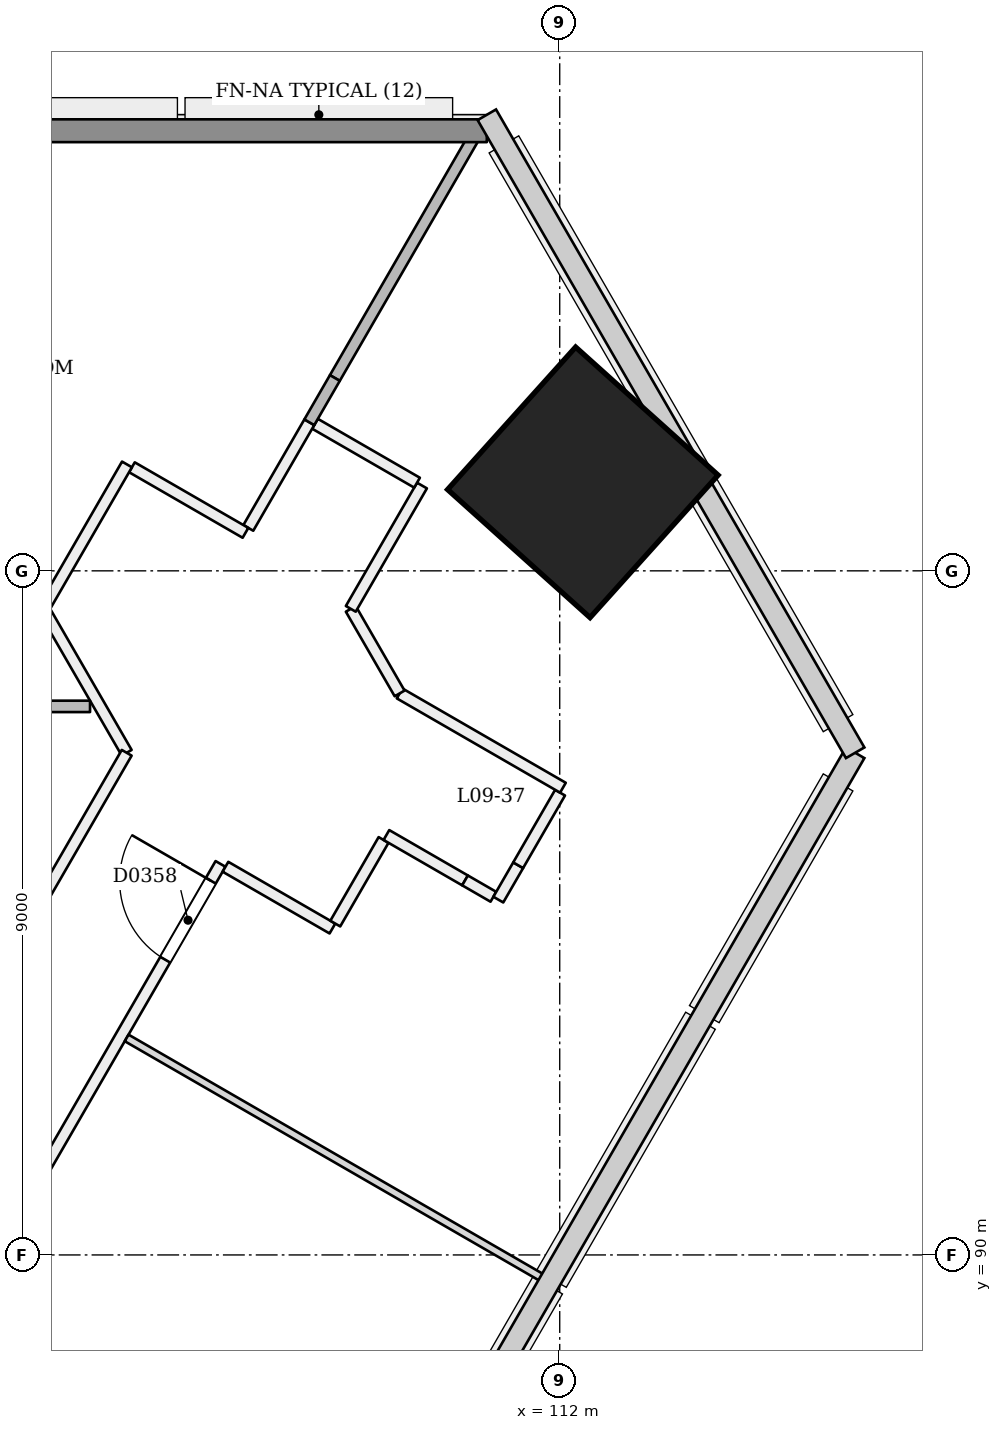
"""IFC4 building model, lengths in metres.
Left out: names, types, materials, properties, quantities, classifications, styles, units other than length and angle.
Written with IfcOpenShell. Run it as: python <this file> out.ifc"""

import sys

from ifc_helpers import new_model, si_unit, direction, frame, frame_2d, origin, origin_2d, place, context, subcontext, project, spatial, rectangle, extrude, element, fill, save


model = new_model("IFC4")
c1 = context("Model", 3, precision=1e-05, world=origin(), true_north=direction((0.0, 1.0)))
c2 = subcontext(c1, "Body", "Model", "MODEL_VIEW")
j1 = project(units=[si_unit("LENGTHUNIT", "METRE"), si_unit("PLANEANGLEUNIT", "RADIAN")], contexts=[c1])
p1 = place(None, origin())
s1 = spatial("IfcSite", under=j1, at=p1, CompositionType="ELEMENT")
p2 = place(p1, origin())
s2 = spatial("IfcBuilding", under=s1, at=p2, CompositionType="ELEMENT")
p3 = place(p2, frame((0.0, 0.0, 41.4)))
s3 = spatial("IfcBuildingStorey", under=s2, at=p3, CompositionType="ELEMENT", Elevation=41.4)
p4 = place(p3, frame((112.338, 100.153, 0.0), z_axis=(-0.028334066552, 0.009286524205, 0.999555371723), x_axis=(0.498272969513, -0.866736541076, 0.022176929837)))
e1 = element("IfcColumn", 1, at=p4, inside=s3, PredefinedType="COLUMN", context=c2, shape_type="SweptSolid", body=[
    extrude(rectangle(XDim=2.52, YDim=2.52, at=origin_2d()), origin(), (0.0, 0.0, 1.0), 3.602),
])
p5 = place(p3, frame((88.237, 61.716, 0.0), z_axis=(0.0, 0.0, 1.0), x_axis=(0.500002225217, 0.866024119051, 0.0)))
e2 = element("IfcWall", 2, at=p5, inside=s3, PredefinedType="PARTITIONING", context=c2, shape_type="SweptSolid", body=[
    extrude(rectangle(XDim=38.6, YDim=0.15, at=frame_2d((19.3, 0.0))), origin(), (0.0, 0.0, 1.0), 2.7),
])
p6 = place(p5, frame((0.72, 0.0, 0.0)))
e3 = element("IfcOpeningElement", 3, at=p6, cuts=e2, PredefinedType="OPENING", context=c2, shape_type="SweptSolid", body=[
    extrude(rectangle(XDim=1.0, YDim=2.1, at=frame_2d((0.5, 1.05))), frame((0.0, 0.085, 0.0), z_axis=(0.0, -1.0, 0.0), x_axis=(1.0, 0.0, 0.0)), (0.0, 0.0, 1.0), 0.171),
])
p7 = place(p5, frame((7.395, 0.0, 0.0)))
e4 = element("IfcOpeningElement", 4, at=p7, cuts=e2, PredefinedType="OPENING", context=c2, shape_type="SweptSolid", body=[
    extrude(rectangle(XDim=1.0, YDim=2.1, at=frame_2d((0.5, 1.05))), frame((0.0, 0.085, 0.0), z_axis=(0.0, -1.0, 0.0), x_axis=(1.0, 0.0, 0.0)), (0.0, 0.0, 1.0), 0.171),
])
p8 = place(p5, frame((9.605, 0.0, 0.0)))
e5 = element("IfcOpeningElement", 5, at=p8, cuts=e2, PredefinedType="OPENING", context=c2, shape_type="SweptSolid", body=[
    extrude(rectangle(XDim=1.0, YDim=2.1, at=frame_2d((0.5, 1.05))), frame((0.0, 0.085, 0.0), z_axis=(0.0, -1.0, 0.0), x_axis=(1.0, 0.0, 0.0)), (0.0, 0.0, 1.0), 0.171),
])
p9 = place(p5, frame((15.25, 0.0, 0.0)))
e6 = element("IfcOpeningElement", 6, at=p9, cuts=e2, PredefinedType="OPENING", context=c2, shape_type="SweptSolid", body=[
    extrude(rectangle(XDim=1.0, YDim=2.1, at=frame_2d((0.5, 1.05))), frame((0.0, 0.085, 0.0), z_axis=(0.0, -1.0, 0.0), x_axis=(1.0, 0.0, 0.0)), (0.0, 0.0, 1.0), 0.171),
])
p10 = place(p5, frame((18.605, 0.0, 0.0)))
e7 = element("IfcOpeningElement", 7, at=p10, cuts=e2, PredefinedType="OPENING", context=c2, shape_type="SweptSolid", body=[
    extrude(rectangle(XDim=1.0, YDim=2.1, at=frame_2d((0.5, 1.05))), frame((0.0, 0.085, 0.0), z_axis=(0.0, -1.0, 0.0), x_axis=(1.0, 0.0, 0.0)), (0.0, 0.0, 1.0), 0.171),
])
p11 = place(p5, frame((25.395, 0.0, 0.0)))
e8 = element("IfcOpeningElement", 8, at=p11, cuts=e2, PredefinedType="OPENING", context=c2, shape_type="SweptSolid", body=[
    extrude(rectangle(XDim=1.0, YDim=2.1, at=frame_2d((0.5, 1.05))), frame((0.0, 0.085, 0.0), z_axis=(0.0, -1.0, 0.0), x_axis=(1.0, 0.0, 0.0)), (0.0, 0.0, 1.0), 0.171),
])
p12 = place(p5, frame((29.8, 0.0, 0.0)))
e9 = element("IfcOpeningElement", 9, at=p12, cuts=e2, PredefinedType="OPENING", context=c2, shape_type="SweptSolid", body=[
    extrude(rectangle(XDim=1.2, YDim=2.1, at=frame_2d((0.6, 1.05))), frame((0.0, 0.085, 0.0), z_axis=(0.0, -1.0, 0.0), x_axis=(1.0, 0.0, 0.0)), (0.0, 0.0, 1.0), 0.171),
])
p13 = place(p5, frame((37.145, 0.0, 0.0)))
e10 = element("IfcOpeningElement", 10, at=p13, cuts=e2, PredefinedType="OPENING", context=c2, shape_type="SweptSolid", body=[
    extrude(rectangle(XDim=1.2, YDim=2.1, at=frame_2d((0.6, 1.05))), frame((0.0, 0.085, 0.0), z_axis=(0.0, -1.0, 0.0), x_axis=(1.0, 0.0, 0.0)), (0.0, 0.0, 1.0), 0.171),
])
p14 = place(p3, frame((107.602, 95.107, 0.0), z_axis=(0.0, 0.0, 1.0), x_axis=(0.866053003207, -0.499952193351, 0.0)))
e11 = element("IfcWall", 11, at=p14, inside=s3, PredefinedType="PARTITIONING", context=c2, shape_type="SweptSolid", body=[
    extrude(rectangle(XDim=1.625, YDim=0.15, at=frame_2d((0.812, 0.0))), origin(), (0.0, 0.0, 1.0), 3.1),
])
p15 = place(p3, frame((109.047, 94.359, 0.0), z_axis=(0.0, 0.0, 1.0), x_axis=(0.500066257368, 0.865987146695, 0.0)))
e12 = element("IfcWall", 12, at=p15, inside=s3, PredefinedType="PARTITIONING", context=c2, shape_type="SweptSolid", body=[
    extrude(rectangle(XDim=1.27, YDim=0.15, at=frame_2d((0.635, 0.0))), origin(), (0.0, 0.0, 1.0), 3.1),
])
p16 = place(p3, frame((109.72, 95.524, 0.0), z_axis=(0.0, 0.0, 1.0), x_axis=(0.866046033456, -0.499964266659, 0.0)))
e13 = element("IfcWall", 13, at=p16, inside=s3, PredefinedType="PARTITIONING", context=c2, shape_type="SweptSolid", body=[
    extrude(rectangle(XDim=1.194, YDim=0.15, at=frame_2d((0.597, 0.0))), origin(), (0.0, 0.0, 1.0), 3.1),
])
p17 = place(p3, frame((110.754, 94.927, 0.0), z_axis=(0.0, 0.0, 1.0), x_axis=(0.865930570761, -0.500164219654, 0.0)))
e14 = element("IfcWall", 14, at=p17, inside=s3, PredefinedType="PARTITIONING", context=c2, shape_type="SweptSolid", body=[
    extrude(rectangle(XDim=0.43, YDim=0.15, at=frame_2d((0.215, 0.0))), origin(), (0.0, 0.0, 1.0), 2.6),
])
p18 = place(p3, frame((111.192, 94.675, 0.0), z_axis=(0.0, 0.0, 1.0), x_axis=(0.500262019077, 0.865874074141, 0.0)))
e15 = element("IfcWall", 15, at=p18, inside=s3, PredefinedType="PARTITIONING", context=c2, shape_type="SweptSolid", body=[
    extrude(rectangle(XDim=0.522, YDim=0.15, at=frame_2d((0.261, 0.0))), origin(), (0.0, 0.0, 1.0), 2.6),
])
p19 = place(p3, frame((111.453, 95.127, 0.0), z_axis=(0.0, 0.0, 1.0), x_axis=(0.499901324955, 0.866082366353, 0.0)))
e16 = element("IfcWall", 16, at=p19, inside=s3, PredefinedType="PARTITIONING", context=c2, shape_type="SweptSolid", body=[
    extrude(rectangle(XDim=1.103, YDim=0.15, at=frame_2d((0.551, 0.0))), origin(), (0.0, 0.0, 1.0), 3.1),
])
p20 = place(p3, frame((112.042, 96.147, 0.0), z_axis=(0.0, 0.0, 1.0), x_axis=(-0.866011868261, 0.500023443481, 0.0)))
e17 = element("IfcWall", 17, at=p20, inside=s3, PredefinedType="PARTITIONING", context=c2, shape_type="SweptSolid", body=[
    extrude(rectangle(XDim=2.481, YDim=0.15, at=frame_2d((1.24, 0.0))), origin(), (0.0, 0.0, 1.0), 2.6),
])
p21 = place(p3, frame((109.894, 97.387, 0.0), z_axis=(0.0, 0.0, 1.0), x_axis=(-0.50006233641, 0.86598941085, 0.0)))
e18 = element("IfcWall", 18, at=p21, inside=s3, PredefinedType="PARTITIONING", context=c2, shape_type="SweptSolid", body=[
    extrude(rectangle(XDim=1.285, YDim=0.15, at=frame_2d((0.643, 0.0))), origin(), (0.0, 0.0, 1.0), 3.1),
])
p22 = place(p3, frame((109.251, 98.5, 0.0), z_axis=(0.0, 0.0, 1.0), x_axis=(0.499951854219, 0.86605319898, 0.0)))
e19 = element("IfcWall", 19, at=p22, inside=s3, PredefinedType="PARTITIONING", context=c2, shape_type="SweptSolid", body=[
    extrude(rectangle(XDim=1.873, YDim=0.15, at=frame_2d((0.937, 0.0))), origin(), (0.0, 0.0, 1.0), 3.1),
])
p23 = place(p3, frame((110.123, 100.16, 0.0), z_axis=(0.0, 0.0, 1.0), x_axis=(-0.865975732936, 0.500086022567, 0.0)))
e20 = element("IfcWall", 20, at=p23, inside=s3, PredefinedType="PARTITIONING", context=c2, shape_type="SweptSolid", body=[
    extrude(rectangle(XDim=1.55, YDim=0.15, at=frame_2d((0.775, 0.0))), origin(), (0.0, 0.0, 1.0), 3.1),
])
p24 = place(p3, frame((108.706, 100.955, 0.0), z_axis=(0.0, 0.0, 1.0), x_axis=(-0.500016533484, -0.866015857963, 0.0)))
e21 = element("IfcWall", 21, at=p24, inside=s3, PredefinedType="PARTITIONING", context=c2, shape_type="SweptSolid", body=[
    extrude(rectangle(XDim=1.605, YDim=0.15, at=frame_2d((0.802, 0.0))), origin(), (0.0, 0.0, 1.0), 3.1),
])
p25 = place(p3, frame((107.865, 99.5, 0.0), z_axis=(0.0, 0.0, 1.0), x_axis=(-0.86597814115, 0.500081852351, 0.0)))
e22 = element("IfcWall", 22, at=p25, inside=s3, PredefinedType="PARTITIONING", context=c2, shape_type="SweptSolid", body=[
    extrude(rectangle(XDim=1.725, YDim=0.15, at=frame_2d((0.862, 0.0))), origin(), (0.0, 0.0, 1.0), 3.1),
])
p26 = place(p3, frame((106.307, 100.4, 0.0), z_axis=(0.0, 0.0, 1.0), x_axis=(-0.500005024956, -0.866022502605, 0.0)))
e23 = element("IfcWall", 23, at=p26, inside=s3, PredefinedType="PARTITIONING", context=c2, shape_type="SweptSolid", body=[
    extrude(rectangle(XDim=2.194, YDim=0.15, at=frame_2d((1.097, 0.0))), origin(), (0.0, 0.0, 1.0), 3.1),
])
p27 = place(p3, frame((105.21, 98.5, 0.0), z_axis=(0.0, 0.0, 1.0), x_axis=(0.500005971936, -0.866021955858, 0.0)))
e24 = element("IfcWall", 24, at=p27, inside=s3, PredefinedType="PARTITIONING", context=c2, shape_type="SweptSolid", body=[
    extrude(rectangle(XDim=2.187, YDim=0.15, at=frame_2d((1.093, 0.0))), origin(), (0.0, 0.0, 1.0), 3.1),
])
p28 = place(p3, frame((106.303, 96.606, 0.0), z_axis=(0.0, 0.0, 1.0), x_axis=(-0.49997190975, -0.866041621091, 0.0)))
e25 = element("IfcWall", 25, at=p28, inside=s3, PredefinedType="PARTITIONING", context=c2, shape_type="SweptSolid", body=[
    extrude(rectangle(XDim=4.857, YDim=0.15, at=frame_2d((2.429, 0.0))), origin(), (0.0, 0.0, 1.0), 3.1),
])
p29 = place(p3, frame((111.797, 89.683, 0.0), z_axis=(0.0, 0.0, 1.0), x_axis=(-0.866025401434, 0.500000004071, 0.0)))
e26 = element("IfcWall", 26, at=p29, inside=s3, PredefinedType="PARTITIONING", context=c2, shape_type="SweptSolid", body=[
    extrude(rectangle(XDim=6.345, YDim=0.1, at=frame_2d((3.173, 0.0))), origin(), (0.0, 0.0, 1.0), 2.6),
])
p30 = place(p3, frame((110.983, 104.9, 0.0), z_axis=(0.0, 0.0, 1.0), x_axis=(-0.500000001976, -0.866025402643, 0.0)))
e27 = element("IfcWall", 27, at=p30, inside=s3, PredefinedType="PARTITIONING", context=c2, shape_type="SweptSolid", body=[
    extrude(rectangle(XDim=3.883, YDim=0.15, at=frame_2d((1.942, 0.0))), origin(), (0.0, 0.0, 1.0), 3.1),
])
p31 = place(p3, frame((109.042, 101.537, 0.0), z_axis=(0.0, 0.0, 1.0), x_axis=(-0.500162614387, -0.865931497966, 0.0)))
e28 = element("IfcWall", 28, at=p31, inside=s3, PredefinedType="PARTITIONING", context=c2, shape_type="SweptSolid", body=[
    extrude(rectangle(XDim=0.672, YDim=0.15, at=frame_2d((0.336, 0.0))), origin(), (0.0, 0.0, 1.0), 2.6),
])
p32 = place(p3, frame((99.875, 97.217, 0.0), z_axis=(0.0, 0.0, 1.0), x_axis=(1.0, 0.0, 0.0)))
e29 = element("IfcWall", 29, at=p32, inside=s3, PredefinedType="PARTITIONING", context=c2, shape_type="SweptSolid", body=[
    extrude(rectangle(XDim=5.946, YDim=0.15, at=frame_2d((2.973, 0.0))), origin(), (0.0, 0.0, 1.0), 3.1),
])
p33 = place(p3, frame((58.959, 104.79, 0.0), z_axis=(0.0, 0.0, 1.0), x_axis=(1.0, 0.0, 0.0)))
e30 = element("IfcWall", 30, at=p33, inside=s3, PredefinedType="SOLIDWALL", context=c2, shape_type="SweptSolid", body=[
    extrude(rectangle(XDim=52.082, YDim=0.3, at=frame_2d((26.041, 0.0))), origin(), (0.0, 0.0, 1.0), 2.6),
])
p34 = place(p13, origin())
e31 = element("IfcDoor", 31, at=p34, inside=s3, OperationType="SINGLE_SWING_RIGHT", PredefinedType="NOTDEFINED", context=c2, shape_type="SweptSolid", body=[
    extrude(rectangle(XDim=1.2, YDim=2.1, at=frame_2d((0.6, 1.05))), frame((0.0, 0.025, 0.0), z_axis=(0.0, -1.0, 0.0), x_axis=(1.0, 0.0, 0.0)), (0.0, 0.0, 1.0), 0.05),
])
fill(e10, e31)
save(model, sys.argv[1])
